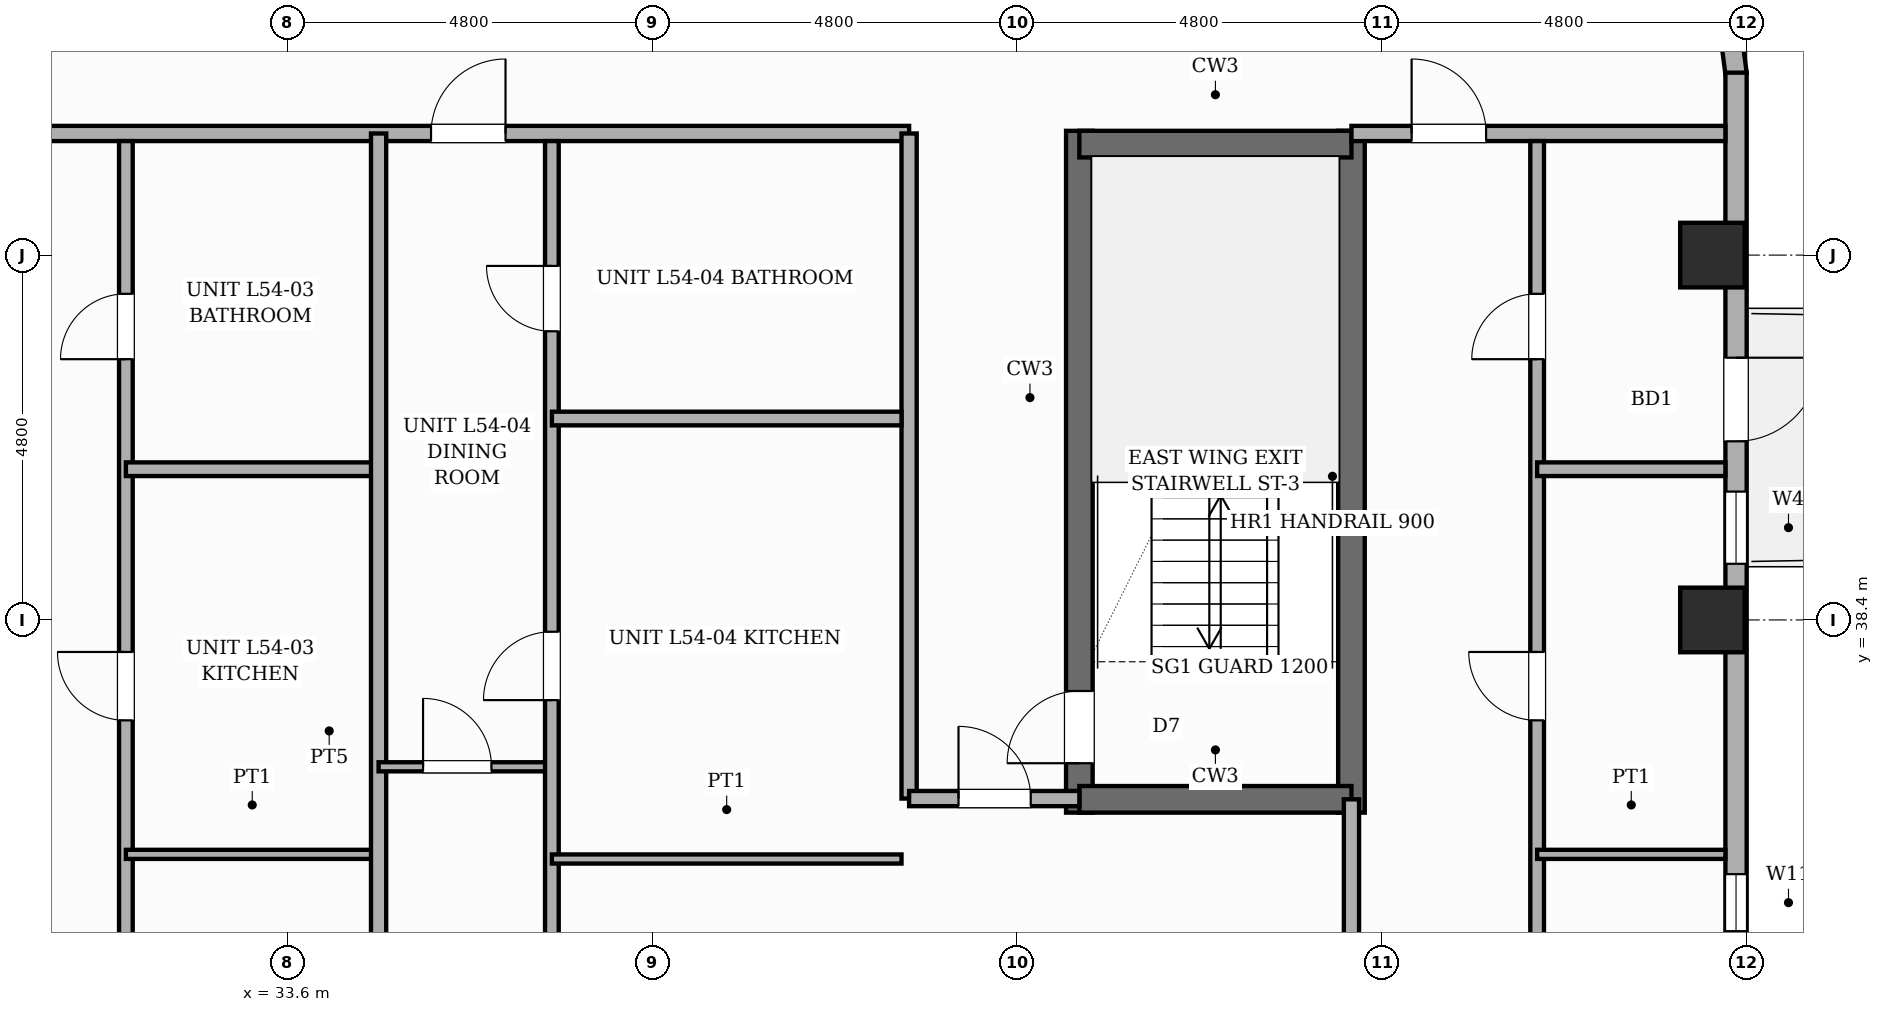
"""IFC4 building model, lengths in metres.
Left out: names, types, materials, properties, quantities, classifications, styles, units other than length and angle.
Written with IfcOpenShell. Run it as: python <this file> out.ifc"""

import sys

from ifc_helpers import new_model, si_unit, direction, frame, frame_2d, origin, origin_2d, place, context, subcontext, project, spatial, rectangle, extrude, element, fill, save


model = new_model("IFC4")
c1 = context("Model", 3, precision=1e-05, world=origin(), true_north=direction((0.0, 1.0)))
c2 = subcontext(c1, "Body", "Model", "MODEL_VIEW")
j1 = project(units=[si_unit("LENGTHUNIT", "METRE"), si_unit("PLANEANGLEUNIT", "RADIAN")], contexts=[c1])
p1 = place(None, origin())
s1 = spatial("IfcSite", under=j1, at=p1, CompositionType="ELEMENT")
p2 = place(p1, origin())
s2 = spatial("IfcBuilding", under=s1, at=p2, CompositionType="ELEMENT")
p3 = place(p2, frame((0.0, 0.0, 207.4)))
s3 = spatial("IfcBuildingStorey", under=s2, at=p3, CompositionType="ELEMENT", Elevation=207.4)
p4 = place(p3, frame((44.02, 35.865, 0.0), z_axis=(0.0, 0.0, 1.0), x_axis=(0.0, 1.0, 0.0)))
e1 = element("IfcWall", 1, at=p4, inside=s3, PredefinedType="SHEAR", context=c2, shape_type="SweptSolid", body=[
    extrude(rectangle(XDim=8.97, YDim=0.35, at=frame_2d((4.485, 0.0))), origin(), (0.0, 0.0, 1.0), 3.6),
])
p5 = place(p4, frame((0.65, 0.0, 0.0)))
e2 = element("IfcOpeningElement", 2, at=p5, cuts=e1, PredefinedType="OPENING", context=c2, shape_type="SweptSolid", body=[
    extrude(rectangle(XDim=0.95, YDim=2.1, at=frame_2d((0.475, 1.05))), frame((0.0, 0.185, 0.0), z_axis=(0.0, -1.0, 0.0), x_axis=(1.0, 0.0, 0.0)), (0.0, 0.0, 1.0), 0.37),
])
p6 = place(p3, frame((47.6, 35.865, 0.0), z_axis=(0.0, 0.0, 1.0), x_axis=(0.0, 1.0, 0.0)))
e3 = element("IfcWall", 3, at=p6, inside=s3, PredefinedType="SHEAR", context=c2, shape_type="SweptSolid", body=[
    extrude(rectangle(XDim=8.97, YDim=0.35, at=frame_2d((4.485, 0.0))), origin(), (0.0, 0.0, 1.0), 3.6),
])
for number, where, z_axis, x_axis in (
    (4, (44.02, 36.04, 0.0), (0.0, 0.0, 1.0), (1.0, 0.0, 0.0)),
    (5, (44.02, 44.66, 0.0), (0.0, 0.0, 1.0), (1.0, 0.0, 0.0)),
):
    element("IfcWall", number, at=place(p3, frame(where, z_axis=z_axis, x_axis=x_axis)), inside=s3, PredefinedType="SHEAR", context=c2, shape_type="SweptSolid", body=[
        extrude(rectangle(XDim=3.58, YDim=0.35, at=frame_2d((1.79, 0.0))), origin(), (0.0, 0.0, 1.0), 3.6),
    ])
for number, where, z_axis, x_axis in (
    (6, (52.35, 38.4, 0.0), (0.0, 0.0, 1.0), (1.0, 0.0, 0.0)),
    (7, (52.35, 43.2, 0.0), (0.0, 0.0, 1.0), (1.0, 0.0, 0.0)),
):
    element("IfcColumn", number, at=place(p3, frame(where, z_axis=z_axis, x_axis=x_axis)), inside=s3, PredefinedType="COLUMN", context=c2, shape_type="SweptSolid", body=[
        extrude(rectangle(XDim=0.85, YDim=0.85, at=origin_2d()), origin(), (0.0, 0.0, 1.0), 3.6),
    ])
p7 = place(p3, frame((52.579, 46.203, 0.0), z_axis=(0.0, 0.0, 1.0), x_axis=(0.130555323746, -0.9914410257, 0.0)))
e8 = element("IfcWall", 8, at=p7, inside=s3, PredefinedType="STANDARD", context=c2, shape_type="SweptSolid", body=[
    extrude(rectangle(XDim=0.626, YDim=0.28, at=frame_2d((0.313, 0.0))), origin(), (0.0, 0.0, 1.0), 2.66),
])
p8 = place(p3, frame((52.66, 45.6, 0.0), z_axis=(0.0, 0.0, 1.0), x_axis=(0.0, -1.0, 0.0)))
e9 = element("IfcWall", 9, at=p8, inside=s3, PredefinedType="STANDARD", context=c2, shape_type="SweptSolid", body=[
    extrude(rectangle(XDim=14.4, YDim=0.28, at=frame_2d((7.2, 0.0))), origin(), (0.0, 0.0, 1.0), 2.66),
])
p9 = place(p8, frame((3.75, 0.0, 0.0)))
e10 = element("IfcOpeningElement", 10, at=p9, cuts=e9, PredefinedType="OPENING", context=c2, shape_type="SweptSolid", body=[
    extrude(rectangle(XDim=1.1, YDim=2.15, at=frame_2d((0.55, 1.075))), frame((0.0, 0.15, 0.0), z_axis=(0.0, -1.0, 0.0), x_axis=(1.0, 0.0, 0.0)), (0.0, 0.0, 1.0), 0.3),
])
p10 = place(p8, frame((10.544, 0.0, 0.45)))
e11 = element("IfcOpeningElement", 11, at=p10, cuts=e9, PredefinedType="OPENING", context=c2, shape_type="SweptSolid", body=[
    extrude(rectangle(XDim=0.75, YDim=1.8, at=frame_2d((0.375, 0.9))), frame((0.0, 0.15, 0.0), z_axis=(0.0, -1.0, 0.0), x_axis=(1.0, 0.0, 0.0)), (0.0, 0.0, 1.0), 0.3),
])
p11 = place(p8, frame((5.511, 0.0, 0.45)))
e12 = element("IfcOpeningElement", 12, at=p11, cuts=e9, PredefinedType="OPENING", context=c2, shape_type="SweptSolid", body=[
    extrude(rectangle(XDim=0.95, YDim=1.8, at=frame_2d((0.475, 0.9))), frame((0.0, 0.15, 0.0), z_axis=(0.0, -1.0, 0.0), x_axis=(1.0, 0.0, 0.0)), (0.0, 0.0, 1.0), 0.3),
])
p12 = place(p3, frame((25.5, 44.8, 0.0), z_axis=(0.0, 0.0, 1.0), x_axis=(1.0, 0.0, 0.0)))
e13 = element("IfcWall", 13, at=p12, inside=s3, PredefinedType="PARTITIONING", context=c2, shape_type="SweptSolid", body=[
    extrude(rectangle(XDim=16.28, YDim=0.2, at=frame_2d((8.14, 0.0))), origin(), (0.0, 0.0, 1.0), 3.38),
])
p13 = place(p12, frame((0.9, 0.0, 0.0)))
e14 = element("IfcOpeningElement", 14, at=p13, cuts=e13, PredefinedType="OPENING", context=c2, shape_type="SweptSolid", body=[
    extrude(rectangle(XDim=0.95, YDim=2.15, at=frame_2d((0.475, 1.075))), frame((0.0, 0.11, 0.0), z_axis=(0.0, -1.0, 0.0), x_axis=(1.0, 0.0, 0.0)), (0.0, 0.0, 1.0), 0.22),
])
p14 = place(p12, frame((3.988, 0.0, 0.0)))
e15 = element("IfcOpeningElement", 15, at=p14, cuts=e13, PredefinedType="OPENING", context=c2, shape_type="SweptSolid", body=[
    extrude(rectangle(XDim=0.98, YDim=2.18, at=frame_2d((0.49, 1.09))), frame((0.0, 0.11, 0.0), z_axis=(0.0, -1.0, 0.0), x_axis=(1.0, 0.0, 0.0)), (0.0, 0.0, 1.0), 0.22),
])
p15 = place(p12, frame((9.99, 0.0, 0.0)))
e16 = element("IfcOpeningElement", 16, at=p15, cuts=e13, PredefinedType="OPENING", context=c2, shape_type="SweptSolid", body=[
    extrude(rectangle(XDim=0.98, YDim=2.18, at=frame_2d((0.49, 1.09))), frame((0.0, 0.11, 0.0), z_axis=(0.0, -1.0, 0.0), x_axis=(1.0, 0.0, 0.0)), (0.0, 0.0, 1.0), 0.22),
])
p16 = place(p3, frame((47.6, 44.8, 0.0), z_axis=(0.0, 0.0, 1.0), x_axis=(1.0, 0.0, 0.0)))
e17 = element("IfcWall", 17, at=p16, inside=s3, PredefinedType="PARTITIONING", context=c2, shape_type="SweptSolid", body=[
    extrude(rectangle(XDim=4.92, YDim=0.2, at=frame_2d((2.46, 0.0))), origin(), (0.0, 0.0, 1.0), 3.38),
])
p17 = place(p16, frame((0.792, 0.0, 0.0)))
e18 = element("IfcOpeningElement", 18, at=p17, cuts=e17, PredefinedType="OPENING", context=c2, shape_type="SweptSolid", body=[
    extrude(rectangle(XDim=0.98, YDim=2.18, at=frame_2d((0.49, 1.09))), frame((0.0, 0.11, 0.0), z_axis=(0.0, -1.0, 0.0), x_axis=(1.0, 0.0, 0.0)), (0.0, 0.0, 1.0), 0.22),
])
p18 = place(p3, frame((41.78, 36.05, 0.0), z_axis=(0.0, 0.0, 1.0), x_axis=(0.0, 1.0, 0.0)))
e19 = element("IfcWall", 19, at=p18, inside=s3, PredefinedType="PARTITIONING", context=c2, shape_type="SweptSolid", body=[
    extrude(rectangle(XDim=8.75, YDim=0.2, at=frame_2d((4.375, 0.0))), origin(), (0.0, 0.0, 1.0), 3.38),
])
p19 = place(p3, frame((41.78, 36.05, 0.0), z_axis=(0.0, 0.0, 1.0), x_axis=(1.0, 0.0, 0.0)))
e20 = element("IfcWall", 20, at=p19, inside=s3, PredefinedType="PARTITIONING", context=c2, shape_type="SweptSolid", body=[
    extrude(rectangle(XDim=2.24, YDim=0.2, at=frame_2d((1.12, 0.0))), origin(), (0.0, 0.0, 1.0), 3.38),
])
p20 = place(p19, frame((0.65, 0.0, 0.0)))
e21 = element("IfcOpeningElement", 21, at=p20, cuts=e20, PredefinedType="OPENING", context=c2, shape_type="SweptSolid", body=[
    extrude(rectangle(XDim=0.95, YDim=2.15, at=frame_2d((0.475, 1.075))), frame((0.0, 0.11, 0.0), z_axis=(0.0, -1.0, 0.0), x_axis=(1.0, 0.0, 0.0)), (0.0, 0.0, 1.0), 0.22),
])
p21 = place(p3, frame((31.475, 29.08, 0.0), z_axis=(0.0, 0.0, 1.0), x_axis=(0.0, 1.0, 0.0)))
e22 = element("IfcWall", 22, at=p21, inside=s3, PredefinedType="PLUMBINGWALL", context=c2, shape_type="SweptSolid", body=[
    extrude(rectangle(XDim=15.62, YDim=0.18, at=frame_2d((7.81, 0.0))), origin(), (0.0, 0.0, 1.0), 3.38),
])
p22 = place(p21, frame((2.223, 0.0, 0.0)))
e23 = element("IfcOpeningElement", 23, at=p22, cuts=e22, PredefinedType="OPENING", context=c2, shape_type="SweptSolid", body=[
    extrude(rectangle(XDim=0.9, YDim=2.15, at=frame_2d((0.45, 1.075))), frame((0.0, 0.1, 0.0), z_axis=(0.0, -1.0, 0.0), x_axis=(1.0, 0.0, 0.0)), (0.0, 0.0, 1.0), 0.2),
])
p23 = place(p21, frame((7.999, 0.0, 0.0)))
e24 = element("IfcOpeningElement", 24, at=p23, cuts=e22, PredefinedType="OPENING", context=c2, shape_type="SweptSolid", body=[
    extrude(rectangle(XDim=0.9, YDim=2.15, at=frame_2d((0.45, 1.075))), frame((0.0, 0.1, 0.0), z_axis=(0.0, -1.0, 0.0), x_axis=(1.0, 0.0, 0.0)), (0.0, 0.0, 1.0), 0.2),
])
p24 = place(p21, frame((12.75, 0.0, 0.0)))
e25 = element("IfcOpeningElement", 25, at=p24, cuts=e22, PredefinedType="OPENING", context=c2, shape_type="SweptSolid", body=[
    extrude(rectangle(XDim=0.86, YDim=2.1, at=frame_2d((0.43, 1.05))), frame((0.0, 0.1, 0.0), z_axis=(0.0, -1.0, 0.0), x_axis=(1.0, 0.0, 0.0)), (0.0, 0.0, 1.0), 0.2),
])
p25 = place(p3, frame((31.475, 35.316, 0.0), z_axis=(0.0, 0.0, 1.0), x_axis=(1.0, 0.0, 0.0)))
e26 = element("IfcWall", 26, at=p25, inside=s3, PredefinedType="PARTITIONING", context=c2, shape_type="SweptSolid", body=[
    extrude(rectangle(XDim=3.325, YDim=0.12, at=frame_2d((1.663, 0.0))), origin(), (0.0, 0.0, 1.0), 3.38),
])
p26 = place(p3, frame((31.475, 40.383, 0.0), z_axis=(0.0, 0.0, 1.0), x_axis=(1.0, 0.0, 0.0)))
e27 = element("IfcWall", 27, at=p26, inside=s3, PredefinedType="PLUMBINGWALL", context=c2, shape_type="SweptSolid", body=[
    extrude(rectangle(XDim=3.325, YDim=0.18, at=frame_2d((1.663, 0.0))), origin(), (0.0, 0.0, 1.0), 3.38),
])
p27 = place(p3, frame((34.8, 29.08, 0.0), z_axis=(0.0, 0.0, 1.0), x_axis=(0.0, 1.0, 0.0)))
e28 = element("IfcWall", 28, at=p27, inside=s3, PredefinedType="SOLIDWALL", context=c2, shape_type="SweptSolid", body=[
    extrude(rectangle(XDim=15.72, YDim=0.2, at=frame_2d((7.86, 0.0))), origin(), (0.0, 0.0, 1.0), 3.38),
])
p28 = place(p3, frame((34.8, 36.468, 0.0), z_axis=(0.0, 0.0, 1.0), x_axis=(1.0, 0.0, 0.0)))
e29 = element("IfcWall", 29, at=p28, inside=s3, PredefinedType="PARTITIONING", context=c2, shape_type="SweptSolid", body=[
    extrude(rectangle(XDim=2.28, YDim=0.12, at=frame_2d((1.14, 0.0))), origin(), (0.0, 0.0, 1.0), 3.38),
])
p29 = place(p28, frame((0.585, 0.0, 0.0)))
e30 = element("IfcOpeningElement", 30, at=p29, cuts=e29, PredefinedType="OPENING", context=c2, shape_type="SweptSolid", body=[
    extrude(rectangle(XDim=0.9, YDim=2.15, at=frame_2d((0.45, 1.075))), frame((0.0, 0.07, 0.0), z_axis=(0.0, -1.0, 0.0), x_axis=(1.0, 0.0, 0.0)), (0.0, 0.0, 1.0), 0.14),
])
p30 = place(p3, frame((37.08, 29.08, 0.0), z_axis=(0.0, 0.0, 1.0), x_axis=(0.0, 1.0, 0.0)))
e31 = element("IfcWall", 31, at=p30, inside=s3, PredefinedType="PLUMBINGWALL", context=c2, shape_type="SweptSolid", body=[
    extrude(rectangle(XDim=15.62, YDim=0.18, at=frame_2d((7.81, 0.0))), origin(), (0.0, 0.0, 1.0), 3.38),
])
p31 = place(p30, frame((2.195, 0.0, 0.0)))
e32 = element("IfcOpeningElement", 32, at=p31, cuts=e31, PredefinedType="OPENING", context=c2, shape_type="SweptSolid", body=[
    extrude(rectangle(XDim=0.9, YDim=2.15, at=frame_2d((0.45, 1.075))), frame((0.0, 0.1, 0.0), z_axis=(0.0, -1.0, 0.0), x_axis=(1.0, 0.0, 0.0)), (0.0, 0.0, 1.0), 0.2),
])
p32 = place(p30, frame((8.265, 0.0, 0.0)))
e33 = element("IfcOpeningElement", 33, at=p32, cuts=e31, PredefinedType="OPENING", context=c2, shape_type="SweptSolid", body=[
    extrude(rectangle(XDim=0.9, YDim=2.15, at=frame_2d((0.45, 1.075))), frame((0.0, 0.1, 0.0), z_axis=(0.0, -1.0, 0.0), x_axis=(1.0, 0.0, 0.0)), (0.0, 0.0, 1.0), 0.2),
])
p33 = place(p30, frame((13.117, 0.0, 0.0)))
e34 = element("IfcOpeningElement", 34, at=p33, cuts=e31, PredefinedType="OPENING", context=c2, shape_type="SweptSolid", body=[
    extrude(rectangle(XDim=0.86, YDim=2.1, at=frame_2d((0.43, 1.05))), frame((0.0, 0.1, 0.0), z_axis=(0.0, -1.0, 0.0), x_axis=(1.0, 0.0, 0.0)), (0.0, 0.0, 1.0), 0.2),
])
p34 = place(p3, frame((37.08, 35.255, 0.0), z_axis=(0.0, 0.0, 1.0), x_axis=(1.0, 0.0, 0.0)))
e35 = element("IfcWall", 35, at=p34, inside=s3, PredefinedType="PARTITIONING", context=c2, shape_type="SweptSolid", body=[
    extrude(rectangle(XDim=4.6, YDim=0.12, at=frame_2d((2.3, 0.0))), origin(), (0.0, 0.0, 1.0), 3.38),
])
p35 = place(p3, frame((37.08, 41.05, 0.0), z_axis=(0.0, 0.0, 1.0), x_axis=(1.0, 0.0, 0.0)))
e36 = element("IfcWall", 36, at=p35, inside=s3, PredefinedType="PLUMBINGWALL", context=c2, shape_type="SweptSolid", body=[
    extrude(rectangle(XDim=4.6, YDim=0.18, at=frame_2d((2.3, 0.0))), origin(), (0.0, 0.0, 1.0), 3.38),
])
p36 = place(p3, frame((47.6, 29.08, 0.0), z_axis=(0.0, 0.0, 1.0), x_axis=(0.0, 1.0, 0.0)))
e37 = element("IfcWall", 37, at=p36, inside=s3, PredefinedType="SOLIDWALL", context=c2, shape_type="SweptSolid", body=[
    extrude(rectangle(XDim=6.96, YDim=0.2, at=frame_2d((3.48, 0.0))), origin(), (0.0, 0.0, 1.0), 3.38),
])
p37 = place(p3, frame((50.043, 29.08, 0.0), z_axis=(0.0, 0.0, 1.0), x_axis=(0.0, 1.0, 0.0)))
e38 = element("IfcWall", 38, at=p37, inside=s3, PredefinedType="PLUMBINGWALL", context=c2, shape_type="SweptSolid", body=[
    extrude(rectangle(XDim=15.62, YDim=0.18, at=frame_2d((7.81, 0.0))), origin(), (0.0, 0.0, 1.0), 3.38),
])
p38 = place(p37, frame((2.223, 0.0, 0.0)))
e39 = element("IfcOpeningElement", 39, at=p38, cuts=e38, PredefinedType="OPENING", context=c2, shape_type="SweptSolid", body=[
    extrude(rectangle(XDim=0.9, YDim=2.15, at=frame_2d((0.45, 1.075))), frame((0.0, 0.1, 0.0), z_axis=(0.0, -1.0, 0.0), x_axis=(1.0, 0.0, 0.0)), (0.0, 0.0, 1.0), 0.2),
])
p39 = place(p37, frame((7.999, 0.0, 0.0)))
e40 = element("IfcOpeningElement", 40, at=p39, cuts=e38, PredefinedType="OPENING", context=c2, shape_type="SweptSolid", body=[
    extrude(rectangle(XDim=0.9, YDim=2.15, at=frame_2d((0.45, 1.075))), frame((0.0, 0.1, 0.0), z_axis=(0.0, -1.0, 0.0), x_axis=(1.0, 0.0, 0.0)), (0.0, 0.0, 1.0), 0.2),
])
p40 = place(p37, frame((12.75, 0.0, 0.0)))
e41 = element("IfcOpeningElement", 41, at=p40, cuts=e38, PredefinedType="OPENING", context=c2, shape_type="SweptSolid", body=[
    extrude(rectangle(XDim=0.86, YDim=2.1, at=frame_2d((0.43, 1.05))), frame((0.0, 0.1, 0.0), z_axis=(0.0, -1.0, 0.0), x_axis=(1.0, 0.0, 0.0)), (0.0, 0.0, 1.0), 0.2),
])
p41 = place(p3, frame((50.043, 35.316, 0.0), z_axis=(0.0, 0.0, 1.0), x_axis=(1.0, 0.0, 0.0)))
e42 = element("IfcWall", 42, at=p41, inside=s3, PredefinedType="PARTITIONING", context=c2, shape_type="SweptSolid", body=[
    extrude(rectangle(XDim=2.477, YDim=0.12, at=frame_2d((1.239, 0.0))), origin(), (0.0, 0.0, 1.0), 3.38),
])
p42 = place(p3, frame((50.043, 40.383, 0.0), z_axis=(0.0, 0.0, 1.0), x_axis=(1.0, 0.0, 0.0)))
e43 = element("IfcWall", 43, at=p42, inside=s3, PredefinedType="PLUMBINGWALL", context=c2, shape_type="SweptSolid", body=[
    extrude(rectangle(XDim=2.477, YDim=0.18, at=frame_2d((1.239, 0.0))), origin(), (0.0, 0.0, 1.0), 3.38),
])
p43 = place(p9, origin())
e44 = element("IfcDoor", 44, at=p43, inside=s3, OperationType="SINGLE_SWING_LEFT", PredefinedType="DOOR", context=c2, shape_type="SweptSolid", body=[
    extrude(rectangle(XDim=1.1, YDim=2.15, at=frame_2d((0.55, 1.075))), frame((0.0, 0.025, 0.0), z_axis=(0.0, -1.0, 0.0), x_axis=(1.0, 0.0, 0.0)), (0.0, 0.0, 1.0), 0.05),
])
fill(e10, e44)
p44 = place(p10, origin())
e45 = element("IfcWindow", 45, at=p44, inside=s3, PartitioningType="SINGLE_PANEL", PredefinedType="WINDOW", context=c2, shape_type="SweptSolid", body=[
    extrude(rectangle(XDim=0.75, YDim=1.8, at=frame_2d((0.375, 0.9))), frame((0.0, 0.03, 0.0), z_axis=(0.0, -1.0, 0.0), x_axis=(1.0, 0.0, 0.0)), (0.0, 0.0, 1.0), 0.06),
])
fill(e11, e45)
p45 = place(p11, origin())
e46 = element("IfcWindow", 46, at=p45, inside=s3, PartitioningType="SINGLE_PANEL", PredefinedType="WINDOW", context=c2, shape_type="SweptSolid", body=[
    extrude(rectangle(XDim=0.95, YDim=1.8, at=frame_2d((0.475, 0.9))), frame((0.0, 0.03, 0.0), z_axis=(0.0, -1.0, 0.0), x_axis=(1.0, 0.0, 0.0)), (0.0, 0.0, 1.0), 0.06),
])
fill(e12, e46)
p46 = place(p5, origin())
e47 = element("IfcDoor", 47, at=p46, inside=s3, OperationType="SINGLE_SWING_LEFT", PredefinedType="DOOR", context=c2, shape_type="SweptSolid", body=[
    extrude(rectangle(XDim=0.95, YDim=2.1, at=frame_2d((0.475, 1.05))), frame((0.0, 0.025, 0.0), z_axis=(0.0, -1.0, 0.0), x_axis=(1.0, 0.0, 0.0)), (0.0, 0.0, 1.0), 0.05),
])
fill(e2, e47)
p47 = place(p23, origin())
e48 = element("IfcDoor", 48, at=p47, inside=s3, OperationType="SINGLE_SWING_RIGHT", PredefinedType="DOOR", context=c2, shape_type="SweptSolid", body=[
    extrude(rectangle(XDim=0.9, YDim=2.15, at=frame_2d((0.45, 1.075))), frame((0.0, 0.025, 0.0), z_axis=(0.0, -1.0, 0.0), x_axis=(1.0, 0.0, 0.0)), (0.0, 0.0, 1.0), 0.05),
])
fill(e24, e48)
p48 = place(p24, origin())
e49 = element("IfcDoor", 49, at=p48, inside=s3, OperationType="SINGLE_SWING_LEFT", PredefinedType="DOOR", context=c2, shape_type="SweptSolid", body=[
    extrude(rectangle(XDim=0.86, YDim=2.1, at=frame_2d((0.43, 1.05))), frame((0.0, 0.025, 0.0), z_axis=(0.0, -1.0, 0.0), x_axis=(1.0, 0.0, 0.0)), (0.0, 0.0, 1.0), 0.05),
])
fill(e25, e49)
p49 = place(p15, origin())
e50 = element("IfcDoor", 50, at=p49, inside=s3, OperationType="SINGLE_SWING_RIGHT", PredefinedType="DOOR", context=c2, shape_type="SweptSolid", body=[
    extrude(rectangle(XDim=0.98, YDim=2.18, at=frame_2d((0.49, 1.09))), frame((0.0, 0.025, 0.0), z_axis=(0.0, -1.0, 0.0), x_axis=(1.0, 0.0, 0.0)), (0.0, 0.0, 1.0), 0.05),
])
fill(e16, e50)
p50 = place(p29, origin())
e51 = element("IfcDoor", 51, at=p50, inside=s3, OperationType="SINGLE_SWING_LEFT", PredefinedType="DOOR", context=c2, shape_type="SweptSolid", body=[
    extrude(rectangle(XDim=0.9, YDim=2.15, at=frame_2d((0.45, 1.075))), frame((0.0, 0.025, 0.0), z_axis=(0.0, -1.0, 0.0), x_axis=(1.0, 0.0, 0.0)), (0.0, 0.0, 1.0), 0.05),
])
fill(e30, e51)
p51 = place(p32, origin())
e52 = element("IfcDoor", 52, at=p51, inside=s3, OperationType="SINGLE_SWING_LEFT", PredefinedType="DOOR", context=c2, shape_type="SweptSolid", body=[
    extrude(rectangle(XDim=0.9, YDim=2.15, at=frame_2d((0.45, 1.075))), frame((0.0, 0.025, 0.0), z_axis=(0.0, -1.0, 0.0), x_axis=(1.0, 0.0, 0.0)), (0.0, 0.0, 1.0), 0.05),
])
fill(e33, e52)
p52 = place(p33, origin())
e53 = element("IfcDoor", 53, at=p52, inside=s3, OperationType="SINGLE_SWING_RIGHT", PredefinedType="DOOR", context=c2, shape_type="SweptSolid", body=[
    extrude(rectangle(XDim=0.86, YDim=2.1, at=frame_2d((0.43, 1.05))), frame((0.0, 0.025, 0.0), z_axis=(0.0, -1.0, 0.0), x_axis=(1.0, 0.0, 0.0)), (0.0, 0.0, 1.0), 0.05),
])
fill(e34, e53)
p53 = place(p20, origin())
e54 = element("IfcDoor", 54, at=p53, inside=s3, OperationType="SINGLE_SWING_LEFT", PredefinedType="DOOR", context=c2, shape_type="SweptSolid", body=[
    extrude(rectangle(XDim=0.95, YDim=2.15, at=frame_2d((0.475, 1.075))), frame((0.0, 0.025, 0.0), z_axis=(0.0, -1.0, 0.0), x_axis=(1.0, 0.0, 0.0)), (0.0, 0.0, 1.0), 0.05),
])
fill(e21, e54)
p54 = place(p17, origin())
e55 = element("IfcDoor", 55, at=p54, inside=s3, OperationType="SINGLE_SWING_LEFT", PredefinedType="DOOR", context=c2, shape_type="SweptSolid", body=[
    extrude(rectangle(XDim=0.98, YDim=2.18, at=frame_2d((0.49, 1.09))), frame((0.0, 0.025, 0.0), z_axis=(0.0, -1.0, 0.0), x_axis=(1.0, 0.0, 0.0)), (0.0, 0.0, 1.0), 0.05),
])
fill(e18, e55)
p55 = place(p39, origin())
e56 = element("IfcDoor", 56, at=p55, inside=s3, OperationType="SINGLE_SWING_RIGHT", PredefinedType="DOOR", context=c2, shape_type="SweptSolid", body=[
    extrude(rectangle(XDim=0.9, YDim=2.15, at=frame_2d((0.45, 1.075))), frame((0.0, 0.025, 0.0), z_axis=(0.0, -1.0, 0.0), x_axis=(1.0, 0.0, 0.0)), (0.0, 0.0, 1.0), 0.05),
])
fill(e40, e56)
p56 = place(p40, origin())
e57 = element("IfcDoor", 57, at=p56, inside=s3, OperationType="SINGLE_SWING_LEFT", PredefinedType="DOOR", context=c2, shape_type="SweptSolid", body=[
    extrude(rectangle(XDim=0.86, YDim=2.1, at=frame_2d((0.43, 1.05))), frame((0.0, 0.025, 0.0), z_axis=(0.0, -1.0, 0.0), x_axis=(1.0, 0.0, 0.0)), (0.0, 0.0, 1.0), 0.05),
])
fill(e41, e57)
save(model, sys.argv[1])
